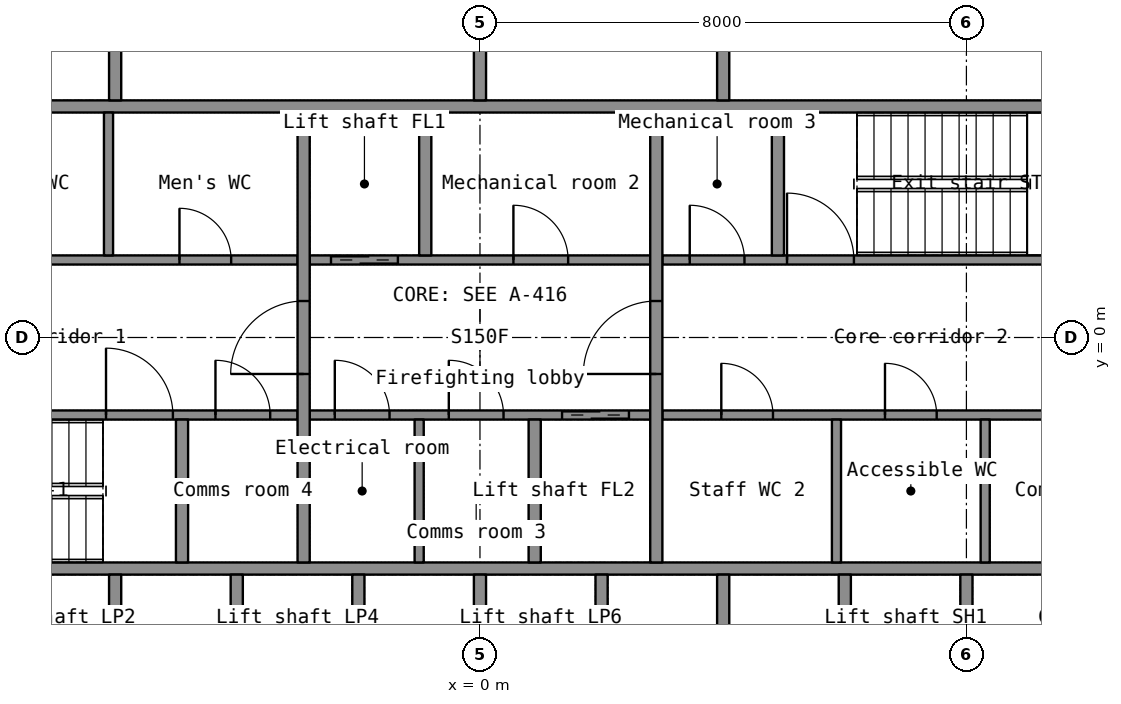
"""IFC4 building model, lengths in metres.
Left out: names, types, materials, properties, quantities, classifications, styles, units other than length and angle.
Written with IfcOpenShell. Run it as: python <this file> out.ifc"""

import sys

from ifc_helpers import new_model, si_unit, direction, frame, frame_2d, origin, place, context, subcontext, project, spatial, rectangle, extrude, element, fill, save


model = new_model("IFC4")
c1 = context("Model", 3, precision=1e-05, world=origin(), true_north=direction((0.0, 1.0)))
c2 = subcontext(c1, "Body", "Model", "MODEL_VIEW")
j1 = project(units=[si_unit("LENGTHUNIT", "METRE"), si_unit("PLANEANGLEUNIT", "RADIAN")], contexts=[c1])
p1 = place(None, origin())
s1 = spatial("IfcSite", under=j1, at=p1, CompositionType="ELEMENT")
p2 = place(p1, origin())
s2 = spatial("IfcBuilding", under=s1, at=p2, CompositionType="ELEMENT")
p3 = place(p2, frame((0.0, 0.0, 111.9)))
s3 = spatial("IfcBuildingStorey", under=s2, at=p3, CompositionType="ELEMENT", Elevation=111.9)
for number, where, z_axis, x_axis in (
    (1, (-11.5, -3.8, 0.0), (0.0, 0.0, 1.0), (1.0, 0.0, 0.0)),
    (2, (-11.5, 3.8, 0.0), (0.0, 0.0, 1.0), (1.0, 0.0, 0.0)),
):
    element("IfcWall", number, at=place(p3, frame(where, z_axis=z_axis, x_axis=x_axis)), inside=s3, PredefinedType="SHEAR", context=c2, shape_type="SweptSolid", body=[
        extrude(rectangle(XDim=23.0, YDim=0.2, at=frame_2d((11.5, 0.0))), origin(), (0.0, 0.0, 1.0), 3.3),
    ])
for number, where, z_axis, x_axis in (
    (3, (-6.0, -6.7, 0.0), (0.0, 0.0, 1.0), (0.0, 1.0, 0.0)),
    (4, (-4.0, -6.7, 0.0), (0.0, 0.0, 1.0), (0.0, 1.0, 0.0)),
    (5, (-2.0, -6.7, 0.0), (0.0, 0.0, 1.0), (0.0, 1.0, 0.0)),
    (6, (0.0, -6.7, 0.0), (0.0, 0.0, 1.0), (0.0, 1.0, 0.0)),
    (7, (2.0, -6.7, 0.0), (0.0, 0.0, 1.0), (0.0, 1.0, 0.0)),
    (8, (4.0, -6.7, 0.0), (0.0, 0.0, 1.0), (0.0, 1.0, 0.0)),
    (9, (6.0, -6.7, 0.0), (0.0, 0.0, 1.0), (0.0, 1.0, 0.0)),
    (10, (8.0, -6.7, 0.0), (0.0, 0.0, 1.0), (0.0, 1.0, 0.0)),
    (11, (-6.0, 3.9, 0.0), (0.0, 0.0, 1.0), (0.0, 1.0, 0.0)),
):
    element("IfcWall", number, at=place(p3, frame(where, z_axis=z_axis, x_axis=x_axis)), inside=s3, PredefinedType="SHEAR", context=c2, shape_type="SweptSolid", body=[
        extrude(rectangle(XDim=2.8, YDim=0.2, at=frame_2d((1.4, 0.0))), origin(), (0.0, 0.0, 1.0), 3.3),
    ])
for number, where, z_axis, x_axis in (
    (12, (0.0, 3.9, 0.0), (0.0, 0.0, 1.0), (0.0, 1.0, 0.0)),
    (13, (4.0, 3.9, 0.0), (0.0, 0.0, 1.0), (0.0, 1.0, 0.0)),
):
    element("IfcWall", number, at=place(p3, frame(where, z_axis=z_axis, x_axis=x_axis)), inside=s3, PredefinedType="PARTITIONING", context=c2, shape_type="SweptSolid", body=[
        extrude(rectangle(XDim=2.8, YDim=0.2, at=frame_2d((1.4, 0.0))), origin(), (0.0, 0.0, 1.0), 3.3),
    ])
p4 = place(p3, frame((-11.5, -1.275, 0.0), z_axis=(0.0, 0.0, 1.0), x_axis=(1.0, 0.0, 0.0)))
e14 = element("IfcWall", 14, at=p4, inside=s3, PredefinedType="SHEAR", context=c2, shape_type="SweptSolid", body=[
    extrude(rectangle(XDim=8.5, YDim=0.15, at=frame_2d((4.25, 0.0))), origin(), (0.0, 0.0, 1.0), 3.3),
])
p5 = place(p4, frame((5.35, 0.0, 0.0)))
e15 = element("IfcOpeningElement", 15, at=p5, cuts=e14, PredefinedType="OPENING", context=c2, shape_type="SweptSolid", body=[
    extrude(rectangle(XDim=1.1, YDim=2.15, at=frame_2d((0.55, 1.075))), frame((0.0, 0.085, 0.0), z_axis=(0.0, -1.0, 0.0), x_axis=(1.0, 0.0, 0.0)), (0.0, 0.0, 1.0), 0.17),
])
p6 = place(p4, frame((7.15, 0.0, 0.0)))
e16 = element("IfcOpeningElement", 16, at=p6, cuts=e14, PredefinedType="OPENING", context=c2, shape_type="SweptSolid", body=[
    extrude(rectangle(XDim=0.9, YDim=2.1, at=frame_2d((0.45, 1.05))), frame((0.0, 0.085, 0.0), z_axis=(0.0, -1.0, 0.0), x_axis=(1.0, 0.0, 0.0)), (0.0, 0.0, 1.0), 0.17),
])
p7 = place(p3, frame((-2.8, -1.275, 0.0), z_axis=(0.0, 0.0, 1.0), x_axis=(1.0, 0.0, 0.0)))
e17 = element("IfcWall", 17, at=p7, inside=s3, PredefinedType="SHEAR", context=c2, shape_type="SweptSolid", body=[
    extrude(rectangle(XDim=5.6, YDim=0.15, at=frame_2d((2.8, 0.0))), origin(), (0.0, 0.0, 1.0), 3.3),
])
p8 = place(p7, frame((4.15, 0.0, 0.0)))
e18 = element("IfcOpeningElement", 18, at=p8, cuts=e17, PredefinedType="OPENING", context=c2, shape_type="SweptSolid", body=[
    extrude(rectangle(XDim=1.1, YDim=2.2, at=frame_2d((0.55, 1.1))), frame((0.0, 0.085, 0.0), z_axis=(0.0, -1.0, 0.0), x_axis=(1.0, 0.0, 0.0)), (0.0, 0.0, 1.0), 0.17),
])
p9 = place(p7, frame((0.413, 0.0, 0.0)))
e19 = element("IfcOpeningElement", 19, at=p9, cuts=e17, PredefinedType="OPENING", context=c2, shape_type="SweptSolid", body=[
    extrude(rectangle(XDim=0.9, YDim=2.1, at=frame_2d((0.45, 1.05))), frame((0.0, 0.085, 0.0), z_axis=(0.0, -1.0, 0.0), x_axis=(1.0, 0.0, 0.0)), (0.0, 0.0, 1.0), 0.17),
])
p10 = place(p7, frame((2.288, 0.0, 0.0)))
e20 = element("IfcOpeningElement", 20, at=p10, cuts=e17, PredefinedType="OPENING", context=c2, shape_type="SweptSolid", body=[
    extrude(rectangle(XDim=0.9, YDim=2.1, at=frame_2d((0.45, 1.05))), frame((0.0, 0.085, 0.0), z_axis=(0.0, -1.0, 0.0), x_axis=(1.0, 0.0, 0.0)), (0.0, 0.0, 1.0), 0.17),
])
p11 = place(p3, frame((3.0, -1.275, 0.0), z_axis=(0.0, 0.0, 1.0), x_axis=(1.0, 0.0, 0.0)))
e21 = element("IfcWall", 21, at=p11, inside=s3, PredefinedType="PARTITIONING", context=c2, shape_type="SweptSolid", body=[
    extrude(rectangle(XDim=8.5, YDim=0.15, at=frame_2d((4.25, 0.0))), origin(), (0.0, 0.0, 1.0), 3.3),
])
p12 = place(p11, frame((0.969, 0.0, 0.0)))
e22 = element("IfcOpeningElement", 22, at=p12, cuts=e21, PredefinedType="OPENING", context=c2, shape_type="SweptSolid", body=[
    extrude(rectangle(XDim=0.85, YDim=2.1, at=frame_2d((0.425, 1.05))), frame((0.0, 0.085, 0.0), z_axis=(0.0, -1.0, 0.0), x_axis=(1.0, 0.0, 0.0)), (0.0, 0.0, 1.0), 0.17),
])
p13 = place(p11, frame((3.661, 0.0, 0.0)))
e23 = element("IfcOpeningElement", 23, at=p13, cuts=e21, PredefinedType="OPENING", context=c2, shape_type="SweptSolid", body=[
    extrude(rectangle(XDim=0.85, YDim=2.1, at=frame_2d((0.425, 1.05))), frame((0.0, 0.085, 0.0), z_axis=(0.0, -1.0, 0.0), x_axis=(1.0, 0.0, 0.0)), (0.0, 0.0, 1.0), 0.17),
])
p14 = place(p11, frame((6.492, 0.0, 0.0)))
e24 = element("IfcOpeningElement", 24, at=p14, cuts=e21, PredefinedType="OPENING", context=c2, shape_type="SweptSolid", body=[
    extrude(rectangle(XDim=0.9, YDim=2.1, at=frame_2d((0.45, 1.05))), frame((0.0, 0.085, 0.0), z_axis=(0.0, -1.0, 0.0), x_axis=(1.0, 0.0, 0.0)), (0.0, 0.0, 1.0), 0.17),
])
p15 = place(p3, frame((-11.5, 1.275, 0.0), z_axis=(0.0, 0.0, 1.0), x_axis=(1.0, 0.0, 0.0)))
e25 = element("IfcWall", 25, at=p15, inside=s3, PredefinedType="PARTITIONING", context=c2, shape_type="SweptSolid", body=[
    extrude(rectangle(XDim=8.5, YDim=0.15, at=frame_2d((4.25, 0.0))), origin(), (0.0, 0.0, 1.0), 3.3),
])
p16 = place(p15, frame((0.616, 0.0, 0.0)))
e26 = element("IfcOpeningElement", 26, at=p16, cuts=e25, PredefinedType="OPENING", context=c2, shape_type="SweptSolid", body=[
    extrude(rectangle(XDim=0.9, YDim=2.1, at=frame_2d((0.45, 1.05))), frame((0.0, 0.085, 0.0), z_axis=(0.0, -1.0, 0.0), x_axis=(1.0, 0.0, 0.0)), (0.0, 0.0, 1.0), 0.17),
])
p17 = place(p15, frame((3.374, 0.0, 0.0)))
e27 = element("IfcOpeningElement", 27, at=p17, cuts=e25, PredefinedType="OPENING", context=c2, shape_type="SweptSolid", body=[
    extrude(rectangle(XDim=0.85, YDim=2.1, at=frame_2d((0.425, 1.05))), frame((0.0, 0.085, 0.0), z_axis=(0.0, -1.0, 0.0), x_axis=(1.0, 0.0, 0.0)), (0.0, 0.0, 1.0), 0.17),
])
p18 = place(p15, frame((6.558, 0.0, 0.0)))
e28 = element("IfcOpeningElement", 28, at=p18, cuts=e25, PredefinedType="OPENING", context=c2, shape_type="SweptSolid", body=[
    extrude(rectangle(XDim=0.85, YDim=2.1, at=frame_2d((0.425, 1.05))), frame((0.0, 0.085, 0.0), z_axis=(0.0, -1.0, 0.0), x_axis=(1.0, 0.0, 0.0)), (0.0, 0.0, 1.0), 0.17),
])
p19 = place(p3, frame((-2.8, 1.275, 0.0), z_axis=(0.0, 0.0, 1.0), x_axis=(1.0, 0.0, 0.0)))
e29 = element("IfcWall", 29, at=p19, inside=s3, PredefinedType="SHEAR", context=c2, shape_type="SweptSolid", body=[
    extrude(rectangle(XDim=5.6, YDim=0.15, at=frame_2d((2.8, 0.0))), origin(), (0.0, 0.0, 1.0), 3.3),
])
p20 = place(p19, frame((0.35, 0.0, 0.0)))
e30 = element("IfcOpeningElement", 30, at=p20, cuts=e29, PredefinedType="OPENING", context=c2, shape_type="SweptSolid", body=[
    extrude(rectangle(XDim=1.1, YDim=2.2, at=frame_2d((0.55, 1.1))), frame((0.0, 0.085, 0.0), z_axis=(0.0, -1.0, 0.0), x_axis=(1.0, 0.0, 0.0)), (0.0, 0.0, 1.0), 0.17),
])
p21 = place(p19, frame((3.35, 0.0, 0.0)))
e31 = element("IfcOpeningElement", 31, at=p21, cuts=e29, PredefinedType="OPENING", context=c2, shape_type="SweptSolid", body=[
    extrude(rectangle(XDim=0.9, YDim=2.1, at=frame_2d((0.45, 1.05))), frame((0.0, 0.085, 0.0), z_axis=(0.0, -1.0, 0.0), x_axis=(1.0, 0.0, 0.0)), (0.0, 0.0, 1.0), 0.17),
])
p22 = place(p3, frame((3.0, 1.275, 0.0), z_axis=(0.0, 0.0, 1.0), x_axis=(1.0, 0.0, 0.0)))
e32 = element("IfcWall", 32, at=p22, inside=s3, PredefinedType="SHEAR", context=c2, shape_type="SweptSolid", body=[
    extrude(rectangle(XDim=8.5, YDim=0.15, at=frame_2d((4.25, 0.0))), origin(), (0.0, 0.0, 1.0), 3.3),
])
p23 = place(p22, frame((2.05, 0.0, 0.0)))
e33 = element("IfcOpeningElement", 33, at=p23, cuts=e32, PredefinedType="OPENING", context=c2, shape_type="SweptSolid", body=[
    extrude(rectangle(XDim=1.1, YDim=2.15, at=frame_2d((0.55, 1.075))), frame((0.0, 0.085, 0.0), z_axis=(0.0, -1.0, 0.0), x_axis=(1.0, 0.0, 0.0)), (0.0, 0.0, 1.0), 0.17),
])
p24 = place(p22, frame((0.45, 0.0, 0.0)))
e34 = element("IfcOpeningElement", 34, at=p24, cuts=e32, PredefinedType="OPENING", context=c2, shape_type="SweptSolid", body=[
    extrude(rectangle(XDim=0.9, YDim=2.1, at=frame_2d((0.45, 1.05))), frame((0.0, 0.085, 0.0), z_axis=(0.0, -1.0, 0.0), x_axis=(1.0, 0.0, 0.0)), (0.0, 0.0, 1.0), 0.17),
])
p25 = place(p3, frame((-2.9, -3.7, 0.0), z_axis=(0.0, 0.0, 1.0), x_axis=(0.0, 1.0, 0.0)))
e35 = element("IfcWall", 35, at=p25, inside=s3, PredefinedType="SHEAR", context=c2, shape_type="SweptSolid", body=[
    extrude(rectangle(XDim=7.4, YDim=0.2, at=frame_2d((3.7, 0.0))), origin(), (0.0, 0.0, 1.0), 3.3),
])
p26 = place(p25, frame((3.1, 0.0, 0.0)))
e36 = element("IfcOpeningElement", 36, at=p26, cuts=e35, PredefinedType="OPENING", context=c2, shape_type="SweptSolid", body=[
    extrude(rectangle(XDim=1.2, YDim=2.2, at=frame_2d((0.6, 1.1))), frame((0.0, 0.11, 0.0), z_axis=(0.0, -1.0, 0.0), x_axis=(1.0, 0.0, 0.0)), (0.0, 0.0, 1.0), 0.22),
])
p27 = place(p3, frame((2.9, -3.7, 0.0), z_axis=(0.0, 0.0, 1.0), x_axis=(0.0, 1.0, 0.0)))
e37 = element("IfcWall", 37, at=p27, inside=s3, PredefinedType="SHEAR", context=c2, shape_type="SweptSolid", body=[
    extrude(rectangle(XDim=7.4, YDim=0.2, at=frame_2d((3.7, 0.0))), origin(), (0.0, 0.0, 1.0), 3.3),
])
p28 = place(p27, frame((3.1, 0.0, 0.0)))
e38 = element("IfcOpeningElement", 38, at=p28, cuts=e37, PredefinedType="OPENING", context=c2, shape_type="SweptSolid", body=[
    extrude(rectangle(XDim=1.2, YDim=2.2, at=frame_2d((0.6, 1.1))), frame((0.0, 0.11, 0.0), z_axis=(0.0, -1.0, 0.0), x_axis=(1.0, 0.0, 0.0)), (0.0, 0.0, 1.0), 0.22),
])
for number, where, z_axis, x_axis in (
    (39, (-0.9, 1.35, 0.0), (0.0, 0.0, 1.0), (0.0, 1.0, 0.0)),
    (40, (0.9, -3.7, 0.0), (0.0, 0.0, 1.0), (0.0, 1.0, 0.0)),
    (41, (-4.9, -3.7, 0.0), (0.0, 0.0, 1.0), (0.0, 1.0, 0.0)),
    (42, (4.9, 1.35, 0.0), (0.0, 0.0, 1.0), (0.0, 1.0, 0.0)),
):
    element("IfcWall", number, at=place(p3, frame(where, z_axis=z_axis, x_axis=x_axis)), inside=s3, PredefinedType="SHEAR", context=c2, shape_type="SweptSolid", body=[
        extrude(rectangle(XDim=2.35, YDim=0.2, at=frame_2d((1.175, 0.0))), origin(), (0.0, 0.0, 1.0), 3.3),
    ])
for number, where, z_axis, x_axis in (
    (43, (-6.109, 1.35, 0.0), (0.0, 0.0, 1.0), (0.0, 1.0, 0.0)),
    (44, (5.863, -3.7, 0.0), (0.0, 0.0, 1.0), (0.0, 1.0, 0.0)),
    (45, (8.309, -3.7, 0.0), (0.0, 0.0, 1.0), (0.0, 1.0, 0.0)),
    (46, (-1.0, -3.7, 0.0), (0.0, 0.0, 1.0), (0.0, 1.0, 0.0)),
):
    element("IfcWall", number, at=place(p3, frame(where, z_axis=z_axis, x_axis=x_axis)), inside=s3, PredefinedType="PARTITIONING", context=c2, shape_type="SweptSolid", body=[
        extrude(rectangle(XDim=2.35, YDim=0.15, at=frame_2d((1.175, 0.0))), origin(), (0.0, 0.0, 1.0), 3.3),
    ])
p29 = place(p26, origin())
e47 = element("IfcDoor", 47, at=p29, inside=s3, OperationType="SINGLE_SWING_LEFT", PredefinedType="DOOR", context=c2, shape_type="SweptSolid", body=[
    extrude(rectangle(XDim=1.2, YDim=2.2, at=frame_2d((0.6, 1.1))), frame((0.0, 0.025, 0.0), z_axis=(0.0, -1.0, 0.0), x_axis=(1.0, 0.0, 0.0)), (0.0, 0.0, 1.0), 0.05),
])
fill(e36, e47)
p30 = place(p28, origin())
e48 = element("IfcDoor", 48, at=p30, inside=s3, OperationType="SINGLE_SWING_LEFT", PredefinedType="DOOR", context=c2, shape_type="SweptSolid", body=[
    extrude(rectangle(XDim=1.2, YDim=2.2, at=frame_2d((0.6, 1.1))), frame((0.0, 0.025, 0.0), z_axis=(0.0, -1.0, 0.0), x_axis=(1.0, 0.0, 0.0)), (0.0, 0.0, 1.0), 0.05),
])
fill(e38, e48)
p31 = place(p20, origin())
e49 = element("IfcDoor", 49, at=p31, inside=s3, OperationType="DOUBLE_DOOR_SLIDING", PredefinedType="DOOR", context=c2, shape_type="SweptSolid", body=[
    extrude(rectangle(XDim=1.1, YDim=2.2, at=frame_2d((0.55, 1.1))), frame((0.0, 0.025, 0.0), z_axis=(0.0, -1.0, 0.0), x_axis=(1.0, 0.0, 0.0)), (0.0, 0.0, 1.0), 0.05),
])
fill(e30, e49)
p32 = place(p8, origin())
e50 = element("IfcDoor", 50, at=p32, inside=s3, OperationType="DOUBLE_DOOR_SLIDING", PredefinedType="DOOR", context=c2, shape_type="SweptSolid", body=[
    extrude(rectangle(XDim=1.1, YDim=2.2, at=frame_2d((0.55, 1.1))), frame((0.0, 0.025, 0.0), z_axis=(0.0, -1.0, 0.0), x_axis=(1.0, 0.0, 0.0)), (0.0, 0.0, 1.0), 0.05),
])
fill(e18, e50)
p33 = place(p5, origin())
e51 = element("IfcDoor", 51, at=p33, inside=s3, OperationType="SINGLE_SWING_LEFT", PredefinedType="DOOR", context=c2, shape_type="SweptSolid", body=[
    extrude(rectangle(XDim=1.1, YDim=2.15, at=frame_2d((0.55, 1.075))), frame((0.0, 0.025, 0.0), z_axis=(0.0, -1.0, 0.0), x_axis=(1.0, 0.0, 0.0)), (0.0, 0.0, 1.0), 0.05),
])
fill(e15, e51)
p34 = place(p23, origin())
e52 = element("IfcDoor", 52, at=p34, inside=s3, OperationType="SINGLE_SWING_LEFT", PredefinedType="DOOR", context=c2, shape_type="SweptSolid", body=[
    extrude(rectangle(XDim=1.1, YDim=2.15, at=frame_2d((0.55, 1.075))), frame((0.0, 0.025, 0.0), z_axis=(0.0, -1.0, 0.0), x_axis=(1.0, 0.0, 0.0)), (0.0, 0.0, 1.0), 0.05),
])
fill(e33, e52)
p35 = place(p18, origin())
e53 = element("IfcDoor", 53, at=p35, inside=s3, OperationType="SINGLE_SWING_LEFT", PredefinedType="DOOR", context=c2, shape_type="SweptSolid", body=[
    extrude(rectangle(XDim=0.85, YDim=2.1, at=frame_2d((0.425, 1.05))), frame((0.0, 0.025, 0.0), z_axis=(0.0, -1.0, 0.0), x_axis=(1.0, 0.0, 0.0)), (0.0, 0.0, 1.0), 0.05),
])
fill(e28, e53)
p36 = place(p12, origin())
e54 = element("IfcDoor", 54, at=p36, inside=s3, OperationType="SINGLE_SWING_LEFT", PredefinedType="DOOR", context=c2, shape_type="SweptSolid", body=[
    extrude(rectangle(XDim=0.85, YDim=2.1, at=frame_2d((0.425, 1.05))), frame((0.0, 0.025, 0.0), z_axis=(0.0, -1.0, 0.0), x_axis=(1.0, 0.0, 0.0)), (0.0, 0.0, 1.0), 0.05),
])
fill(e22, e54)
p37 = place(p13, origin())
e55 = element("IfcDoor", 55, at=p37, inside=s3, OperationType="SINGLE_SWING_LEFT", PredefinedType="DOOR", context=c2, shape_type="SweptSolid", body=[
    extrude(rectangle(XDim=0.85, YDim=2.1, at=frame_2d((0.425, 1.05))), frame((0.0, 0.025, 0.0), z_axis=(0.0, -1.0, 0.0), x_axis=(1.0, 0.0, 0.0)), (0.0, 0.0, 1.0), 0.05),
])
fill(e23, e55)
p38 = place(p21, origin())
e56 = element("IfcDoor", 56, at=p38, inside=s3, OperationType="SINGLE_SWING_LEFT", PredefinedType="DOOR", context=c2, shape_type="SweptSolid", body=[
    extrude(rectangle(XDim=0.9, YDim=2.1, at=frame_2d((0.45, 1.05))), frame((0.0, 0.025, 0.0), z_axis=(0.0, -1.0, 0.0), x_axis=(1.0, 0.0, 0.0)), (0.0, 0.0, 1.0), 0.05),
])
fill(e31, e56)
p39 = place(p9, origin())
e57 = element("IfcDoor", 57, at=p39, inside=s3, OperationType="SINGLE_SWING_LEFT", PredefinedType="DOOR", context=c2, shape_type="SweptSolid", body=[
    extrude(rectangle(XDim=0.9, YDim=2.1, at=frame_2d((0.45, 1.05))), frame((0.0, 0.025, 0.0), z_axis=(0.0, -1.0, 0.0), x_axis=(1.0, 0.0, 0.0)), (0.0, 0.0, 1.0), 0.05),
])
fill(e19, e57)
p40 = place(p10, origin())
e58 = element("IfcDoor", 58, at=p40, inside=s3, OperationType="SINGLE_SWING_LEFT", PredefinedType="DOOR", context=c2, shape_type="SweptSolid", body=[
    extrude(rectangle(XDim=0.9, YDim=2.1, at=frame_2d((0.45, 1.05))), frame((0.0, 0.025, 0.0), z_axis=(0.0, -1.0, 0.0), x_axis=(1.0, 0.0, 0.0)), (0.0, 0.0, 1.0), 0.05),
])
fill(e20, e58)
p41 = place(p24, origin())
e59 = element("IfcDoor", 59, at=p41, inside=s3, OperationType="SINGLE_SWING_LEFT", PredefinedType="DOOR", context=c2, shape_type="SweptSolid", body=[
    extrude(rectangle(XDim=0.9, YDim=2.1, at=frame_2d((0.45, 1.05))), frame((0.0, 0.025, 0.0), z_axis=(0.0, -1.0, 0.0), x_axis=(1.0, 0.0, 0.0)), (0.0, 0.0, 1.0), 0.05),
])
fill(e34, e59)
p42 = place(p6, origin())
e60 = element("IfcDoor", 60, at=p42, inside=s3, OperationType="SINGLE_SWING_LEFT", PredefinedType="DOOR", context=c2, shape_type="SweptSolid", body=[
    extrude(rectangle(XDim=0.9, YDim=2.1, at=frame_2d((0.45, 1.05))), frame((0.0, 0.025, 0.0), z_axis=(0.0, -1.0, 0.0), x_axis=(1.0, 0.0, 0.0)), (0.0, 0.0, 1.0), 0.05),
])
fill(e16, e60)
save(model, sys.argv[1])
